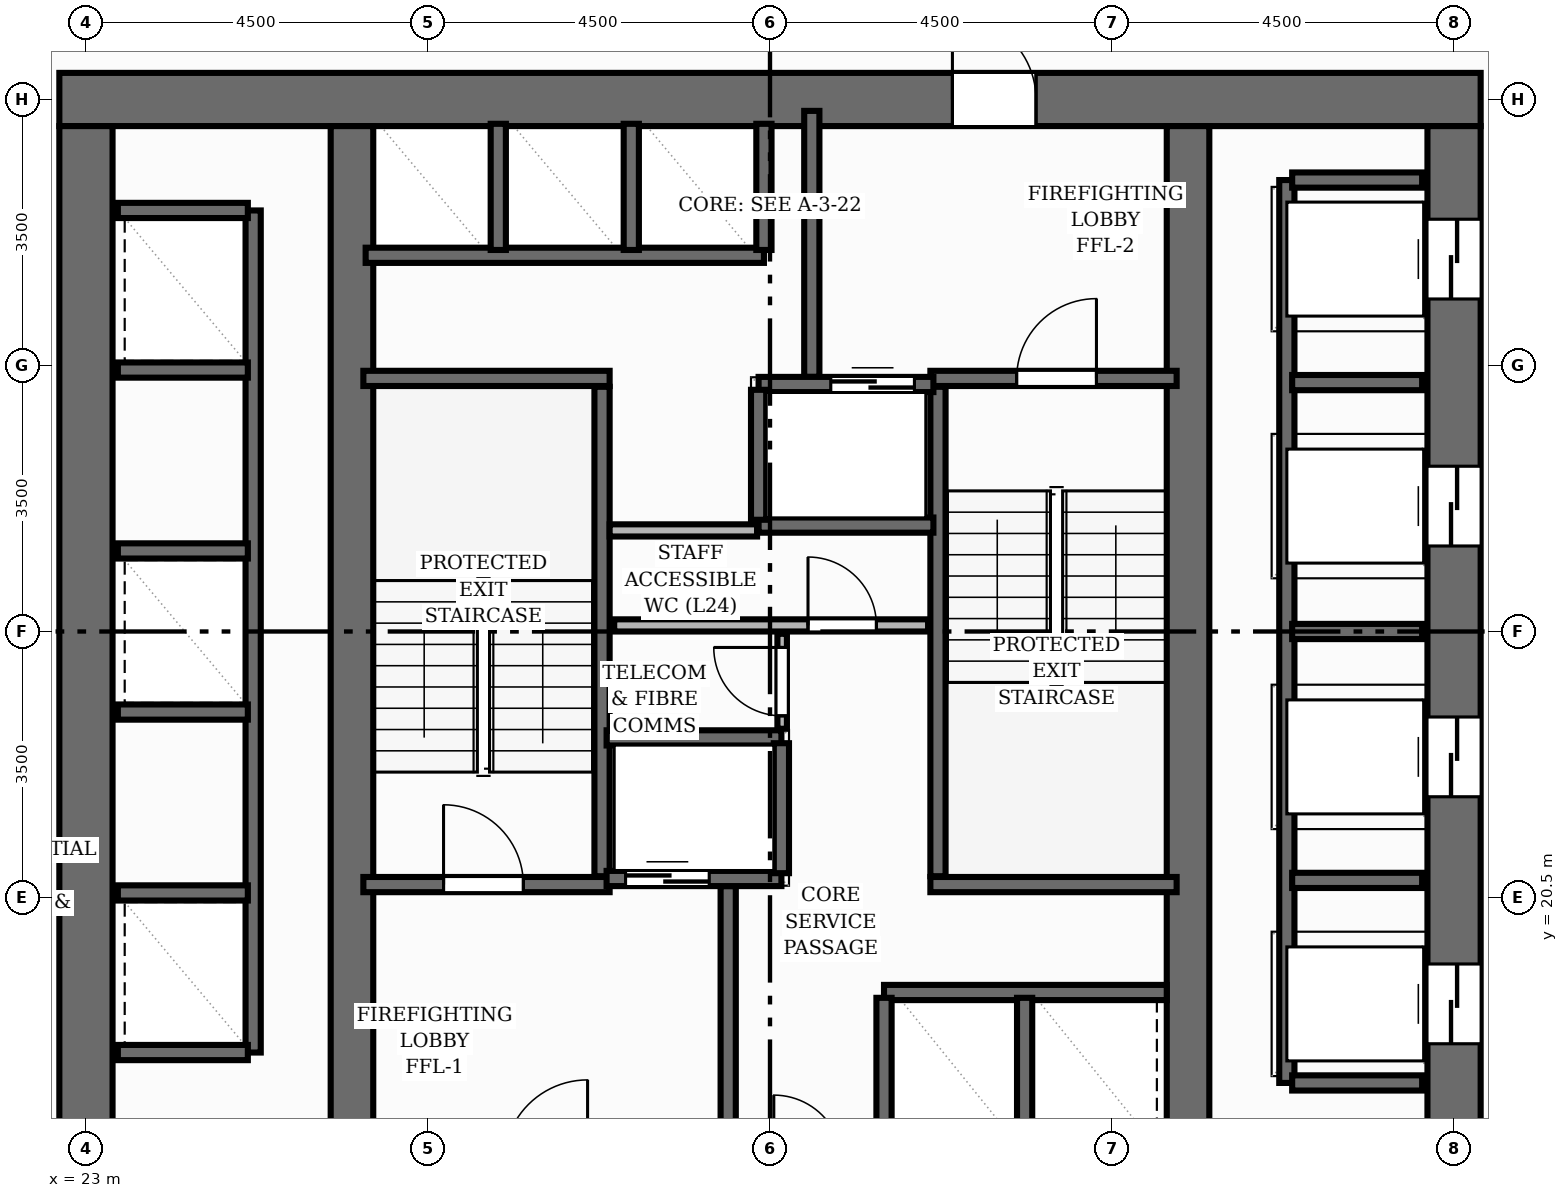
"""IFC4 building model, lengths in metres.
Left out: names, types, materials, properties, quantities, classifications, styles, units other than length and angle.
Written with IfcOpenShell. Run it as: python <this file> out.ifc"""

import sys

from ifc_helpers import new_model, si_unit, direction, frame, frame_2d, origin, place, context, subcontext, project, spatial, rectangle, extrude, element, fill, save


model = new_model("IFC4")
c1 = context("Model", 3, precision=1e-05, world=origin(), true_north=direction((0.0, 1.0)))
c2 = subcontext(c1, "Body", "Model", "MODEL_VIEW")
j1 = project(units=[si_unit("LENGTHUNIT", "METRE"), si_unit("PLANEANGLEUNIT", "RADIAN")], contexts=[c1])
p1 = place(None, origin())
s1 = spatial("IfcSite", under=j1, at=p1, CompositionType="ELEMENT")
p2 = place(p1, origin())
s2 = spatial("IfcBuilding", under=s1, at=p2, CompositionType="ELEMENT")
p3 = place(p2, frame((0.0, 0.0, 83.68)))
s3 = spatial("IfcBuildingStorey", under=s2, at=p3, CompositionType="ELEMENT", Elevation=83.68)
p4 = place(p3, frame((22.65, 31.0, 0.0), z_axis=(0.0, 0.0, 1.0), x_axis=(1.0, 0.0, 0.0)))
e1 = element("IfcWall", 1, at=p4, inside=s3, PredefinedType="SHEAR", context=c2, shape_type="SweptSolid", body=[
    extrude(rectangle(XDim=18.7, YDim=0.7, at=frame_2d((9.35, 0.0))), origin(), (0.0, 0.0, 1.0), 3.2),
])
p5 = place(p4, frame((11.75, 0.0, 0.0)))
e2 = element("IfcOpeningElement", 2, at=p5, cuts=e1, PredefinedType="OPENING", context=c2, shape_type="SweptSolid", body=[
    extrude(rectangle(XDim=1.1, YDim=2.15, at=frame_2d((0.55, 1.075))), frame((0.0, 0.36, 0.0), z_axis=(0.0, -1.0, 0.0), x_axis=(1.0, 0.0, 0.0)), (0.0, 0.0, 1.0), 0.72),
])
p6 = place(p3, frame((23.0, 17.35, 0.0), z_axis=(0.0, 0.0, 1.0), x_axis=(0.0, 1.0, 0.0)))
e3 = element("IfcWall", 3, at=p6, inside=s3, PredefinedType="SHEAR", context=c2, shape_type="SweptSolid", body=[
    extrude(rectangle(XDim=13.3, YDim=0.7, at=frame_2d((6.65, 0.0))), origin(), (0.0, 0.0, 1.0), 3.2),
])
p7 = place(p3, frame((41.0, 17.35, 0.0), z_axis=(0.0, 0.0, 1.0), x_axis=(0.0, 1.0, 0.0)))
e4 = element("IfcWall", 4, at=p7, inside=s3, PredefinedType="SHEAR", context=c2, shape_type="SweptSolid", body=[
    extrude(rectangle(XDim=13.3, YDim=0.7, at=frame_2d((6.65, 0.0))), origin(), (0.0, 0.0, 1.0), 3.2),
])
p8 = place(p7, frame((1.225, 0.0, 0.0)))
e5 = element("IfcOpeningElement", 5, at=p8, cuts=e4, PredefinedType="OPENING", context=c2, shape_type="SweptSolid", body=[
    extrude(rectangle(XDim=1.05, YDim=2.15, at=frame_2d((0.525, 1.075))), frame((0.0, 0.36, 0.0), z_axis=(0.0, -1.0, 0.0), x_axis=(1.0, 0.0, 0.0)), (0.0, 0.0, 1.0), 0.72),
])
p9 = place(p7, frame((4.475, 0.0, 0.0)))
e6 = element("IfcOpeningElement", 6, at=p9, cuts=e4, PredefinedType="OPENING", context=c2, shape_type="SweptSolid", body=[
    extrude(rectangle(XDim=1.05, YDim=2.15, at=frame_2d((0.525, 1.075))), frame((0.0, 0.36, 0.0), z_axis=(0.0, -1.0, 0.0), x_axis=(1.0, 0.0, 0.0)), (0.0, 0.0, 1.0), 0.72),
])
p10 = place(p7, frame((7.775, 0.0, 0.0)))
e7 = element("IfcOpeningElement", 7, at=p10, cuts=e4, PredefinedType="OPENING", context=c2, shape_type="SweptSolid", body=[
    extrude(rectangle(XDim=1.05, YDim=2.15, at=frame_2d((0.525, 1.075))), frame((0.0, 0.36, 0.0), z_axis=(0.0, -1.0, 0.0), x_axis=(1.0, 0.0, 0.0)), (0.0, 0.0, 1.0), 0.72),
])
p11 = place(p7, frame((11.025, 0.0, 0.0)))
e8 = element("IfcOpeningElement", 8, at=p11, cuts=e4, PredefinedType="OPENING", context=c2, shape_type="SweptSolid", body=[
    extrude(rectangle(XDim=1.05, YDim=2.15, at=frame_2d((0.525, 1.075))), frame((0.0, 0.36, 0.0), z_axis=(0.0, -1.0, 0.0), x_axis=(1.0, 0.0, 0.0)), (0.0, 0.0, 1.0), 0.72),
])
for number, where, z_axis, x_axis in (
    (9, (26.5, 17.35, 0.0), (0.0, 0.0, 1.0), (0.0, 1.0, 0.0)),
    (10, (37.5, 17.35, 0.0), (0.0, 0.0, 1.0), (0.0, 1.0, 0.0)),
):
    element("IfcWall", number, at=place(p3, frame(where, z_axis=z_axis, x_axis=x_axis)), inside=s3, PredefinedType="SHEAR", context=c2, shape_type="SweptSolid", body=[
        extrude(rectangle(XDim=13.3, YDim=0.56, at=frame_2d((6.65, 0.0))), origin(), (0.0, 0.0, 1.0), 3.2),
    ])
p12 = place(p3, frame((29.79, 20.78, 0.0), z_axis=(0.0, 0.0, 1.0), x_axis=(0.0, 1.0, 0.0)))
e11 = element("IfcWall", 11, at=p12, inside=s3, PredefinedType="SHEAR", context=c2, shape_type="SweptSolid", body=[
    extrude(rectangle(XDim=6.44, YDim=0.2, at=frame_2d((3.22, 0.0))), origin(), (0.0, 0.0, 1.0), 3.2),
])
p13 = place(p3, frame((26.65, 27.33, 0.0), z_axis=(0.0, 0.0, 1.0), x_axis=(1.0, 0.0, 0.0)))
e12 = element("IfcWall", 12, at=p13, inside=s3, PredefinedType="SHEAR", context=c2, shape_type="SweptSolid", body=[
    extrude(rectangle(XDim=3.24, YDim=0.2, at=frame_2d((1.62, 0.0))), origin(), (0.0, 0.0, 1.0), 3.2),
])
p14 = place(p3, frame((26.65, 20.67, 0.0), z_axis=(0.0, 0.0, 1.0), x_axis=(1.0, 0.0, 0.0)))
e13 = element("IfcWall", 13, at=p14, inside=s3, PredefinedType="SHEAR", context=c2, shape_type="SweptSolid", body=[
    extrude(rectangle(XDim=3.24, YDim=0.2, at=frame_2d((1.62, 0.0))), origin(), (0.0, 0.0, 1.0), 3.2),
])
p15 = place(p14, frame((1.055, 0.0, 0.0)))
e14 = element("IfcOpeningElement", 14, at=p15, cuts=e13, PredefinedType="OPENING", context=c2, shape_type="SweptSolid", body=[
    extrude(rectangle(XDim=1.05, YDim=2.15, at=frame_2d((0.525, 1.075))), frame((0.0, 0.11, 0.0), z_axis=(0.0, -1.0, 0.0), x_axis=(1.0, 0.0, 0.0)), (0.0, 0.0, 1.0), 0.22),
])
p16 = place(p3, frame((34.21, 20.78, 0.0), z_axis=(0.0, 0.0, 1.0), x_axis=(0.0, 1.0, 0.0)))
e15 = element("IfcWall", 15, at=p16, inside=s3, PredefinedType="SHEAR", context=c2, shape_type="SweptSolid", body=[
    extrude(rectangle(XDim=6.44, YDim=0.2, at=frame_2d((3.22, 0.0))), origin(), (0.0, 0.0, 1.0), 3.2),
])
p17 = place(p3, frame((34.11, 20.67, 0.0), z_axis=(0.0, 0.0, 1.0), x_axis=(1.0, 0.0, 0.0)))
e16 = element("IfcWall", 16, at=p17, inside=s3, PredefinedType="SHEAR", context=c2, shape_type="SweptSolid", body=[
    extrude(rectangle(XDim=3.24, YDim=0.2, at=frame_2d((1.62, 0.0))), origin(), (0.0, 0.0, 1.0), 3.2),
])
p18 = place(p3, frame((34.11, 27.33, 0.0), z_axis=(0.0, 0.0, 1.0), x_axis=(1.0, 0.0, 0.0)))
e17 = element("IfcWall", 17, at=p18, inside=s3, PredefinedType="SHEAR", context=c2, shape_type="SweptSolid", body=[
    extrude(rectangle(XDim=3.24, YDim=0.2, at=frame_2d((1.62, 0.0))), origin(), (0.0, 0.0, 1.0), 3.2),
])
p19 = place(p18, frame((1.135, 0.0, 0.0)))
e18 = element("IfcOpeningElement", 18, at=p19, cuts=e17, PredefinedType="OPENING", context=c2, shape_type="SweptSolid", body=[
    extrude(rectangle(XDim=1.05, YDim=2.15, at=frame_2d((0.525, 1.075))), frame((0.0, 0.11, 0.0), z_axis=(0.0, -1.0, 0.0), x_axis=(1.0, 0.0, 0.0)), (0.0, 0.0, 1.0), 0.22),
])
for number, where, z_axis, x_axis in (
    (19, (31.45, 17.15, 0.0), (0.0, 0.0, 1.0), (0.0, 1.0, 0.0)),
    (20, (32.55, 27.35, 0.0), (0.0, 0.0, 1.0), (0.0, 1.0, 0.0)),
):
    element("IfcWall", number, at=place(p3, frame(where, z_axis=z_axis, x_axis=x_axis)), inside=s3, PredefinedType="SHEAR", context=c2, shape_type="SweptSolid", body=[
        extrude(rectangle(XDim=3.5, YDim=0.2, at=frame_2d((1.75, 0.0))), origin(), (0.0, 0.0, 1.0), 3.2),
    ])
p20 = place(p3, frame((29.85, 20.75, 0.0), z_axis=(0.0, 0.0, 1.0), x_axis=(1.0, 0.0, 0.0)))
e21 = element("IfcWall", 21, at=p20, inside=s3, PredefinedType="SHEAR", context=c2, shape_type="SweptSolid", body=[
    extrude(rectangle(XDim=2.3, YDim=0.2, at=frame_2d((1.15, 0.0))), origin(), (0.0, 0.0, 1.0), 3.2),
])
p21 = place(p20, frame((0.25, 0.0, 0.0)))
e22 = element("IfcOpeningElement", 22, at=p21, cuts=e21, PredefinedType="OPENING", context=c2, shape_type="SweptSolid", body=[
    extrude(rectangle(XDim=1.1, YDim=2.15, at=frame_2d((0.55, 1.075))), frame((0.0, 0.11, 0.0), z_axis=(0.0, -1.0, 0.0), x_axis=(1.0, 0.0, 0.0)), (0.0, 0.0, 1.0), 0.22),
])
p22 = place(p3, frame((29.85, 22.6, 0.0), z_axis=(0.0, 0.0, 1.0), x_axis=(1.0, 0.0, 0.0)))
e23 = element("IfcWall", 23, at=p22, inside=s3, PredefinedType="SHEAR", context=c2, shape_type="SweptSolid", body=[
    extrude(rectangle(XDim=2.3, YDim=0.2, at=frame_2d((1.15, 0.0))), origin(), (0.0, 0.0, 1.0), 3.2),
])
p23 = place(p3, frame((32.15, 20.82, 0.0), z_axis=(0.0, 0.0, 1.0), x_axis=(0.0, 1.0, 0.0)))
e24 = element("IfcWall", 24, at=p23, inside=s3, PredefinedType="SHEAR", context=c2, shape_type="SweptSolid", body=[
    extrude(rectangle(XDim=1.71, YDim=0.2, at=frame_2d((0.855, 0.0))), origin(), (0.0, 0.0, 1.0), 3.2),
])
p24 = place(p3, frame((31.85, 27.25, 0.0), z_axis=(0.0, 0.0, 1.0), x_axis=(1.0, 0.0, 0.0)))
e25 = element("IfcWall", 25, at=p24, inside=s3, PredefinedType="SHEAR", context=c2, shape_type="SweptSolid", body=[
    extrude(rectangle(XDim=2.3, YDim=0.2, at=frame_2d((1.15, 0.0))), origin(), (0.0, 0.0, 1.0), 3.2),
])
p25 = place(p24, frame((0.95, 0.0, 0.0)))
e26 = element("IfcOpeningElement", 26, at=p25, cuts=e25, PredefinedType="OPENING", context=c2, shape_type="SweptSolid", body=[
    extrude(rectangle(XDim=1.1, YDim=2.15, at=frame_2d((0.55, 1.075))), frame((0.0, 0.11, 0.0), z_axis=(0.0, -1.0, 0.0), x_axis=(1.0, 0.0, 0.0)), (0.0, 0.0, 1.0), 0.22),
])
p26 = place(p3, frame((31.85, 25.4, 0.0), z_axis=(0.0, 0.0, 1.0), x_axis=(1.0, 0.0, 0.0)))
e27 = element("IfcWall", 27, at=p26, inside=s3, PredefinedType="SHEAR", context=c2, shape_type="SweptSolid", body=[
    extrude(rectangle(XDim=2.3, YDim=0.2, at=frame_2d((1.15, 0.0))), origin(), (0.0, 0.0, 1.0), 3.2),
])
p27 = place(p3, frame((31.85, 25.47, 0.0), z_axis=(0.0, 0.0, 1.0), x_axis=(0.0, 1.0, 0.0)))
e28 = element("IfcWall", 28, at=p27, inside=s3, PredefinedType="SHEAR", context=c2, shape_type="SweptSolid", body=[
    extrude(rectangle(XDim=1.71, YDim=0.2, at=frame_2d((0.855, 0.0))), origin(), (0.0, 0.0, 1.0), 3.2),
])
p28 = place(p3, frame((38.8, 18.06, 0.0), z_axis=(0.0, 0.0, 1.0), x_axis=(0.0, 1.0, 0.0)))
e29 = element("IfcWall", 29, at=p28, inside=s3, PredefinedType="SHEAR", context=c2, shape_type="SweptSolid", body=[
    extrude(rectangle(XDim=11.88, YDim=0.2, at=frame_2d((5.94, 0.0))), origin(), (0.0, 0.0, 1.0), 3.2),
])
for number, where, z_axis, x_axis in (
    (30, (38.87, 18.06, 0.0), (0.0, 0.0, 1.0), (1.0, 0.0, 0.0)),
    (31, (38.87, 29.94, 0.0), (0.0, 0.0, 1.0), (1.0, 0.0, 0.0)),
    (32, (38.87, 20.725, 0.0), (0.0, 0.0, 1.0), (1.0, 0.0, 0.0)),
    (33, (38.87, 24.0, 0.0), (0.0, 0.0, 1.0), (1.0, 0.0, 0.0)),
    (34, (38.87, 27.275, 0.0), (0.0, 0.0, 1.0), (1.0, 0.0, 0.0)),
):
    element("IfcWall", number, at=place(p3, frame(where, z_axis=z_axis, x_axis=x_axis)), inside=s3, PredefinedType="SHEAR", context=c2, shape_type="SweptSolid", body=[
        extrude(rectangle(XDim=1.71, YDim=0.2, at=frame_2d((0.855, 0.0))), origin(), (0.0, 0.0, 1.0), 3.2),
    ])
p29 = place(p3, frame((25.2, 18.46, 0.0), z_axis=(0.0, 0.0, 1.0), x_axis=(0.0, 1.0, 0.0)))
e35 = element("IfcWall", 35, at=p29, inside=s3, PredefinedType="SHEAR", context=c2, shape_type="SweptSolid", body=[
    extrude(rectangle(XDim=11.08, YDim=0.2, at=frame_2d((5.54, 0.0))), origin(), (0.0, 0.0, 1.0), 3.2),
])
for number, where, z_axis, x_axis in (
    (36, (23.42, 18.46, 0.0), (0.0, 0.0, 1.0), (1.0, 0.0, 0.0)),
    (37, (23.42, 29.54, 0.0), (0.0, 0.0, 1.0), (1.0, 0.0, 0.0)),
    (38, (23.42, 20.56, 0.0), (0.0, 0.0, 1.0), (1.0, 0.0, 0.0)),
    (39, (23.42, 22.94, 0.0), (0.0, 0.0, 1.0), (1.0, 0.0, 0.0)),
    (40, (23.42, 25.06, 0.0), (0.0, 0.0, 1.0), (1.0, 0.0, 0.0)),
    (41, (23.42, 27.44, 0.0), (0.0, 0.0, 1.0), (1.0, 0.0, 0.0)),
):
    element("IfcWall", number, at=place(p3, frame(where, z_axis=z_axis, x_axis=x_axis)), inside=s3, PredefinedType="SHEAR", context=c2, shape_type="SweptSolid", body=[
        extrude(rectangle(XDim=1.71, YDim=0.2, at=frame_2d((0.855, 0.0))), origin(), (0.0, 0.0, 1.0), 3.2),
    ])
p30 = place(p3, frame((26.68, 28.95, 0.0), z_axis=(0.0, 0.0, 1.0), x_axis=(1.0, 0.0, 0.0)))
e42 = element("IfcWall", 42, at=p30, inside=s3, PredefinedType="SHEAR", context=c2, shape_type="SweptSolid", body=[
    extrude(rectangle(XDim=5.24, YDim=0.2, at=frame_2d((2.62, 0.0))), origin(), (0.0, 0.0, 1.0), 3.2),
])
for number, where, z_axis, x_axis in (
    (43, (31.92, 29.02, 0.0), (0.0, 0.0, 1.0), (0.0, 1.0, 0.0)),
    (44, (28.425, 29.02, 0.0), (0.0, 0.0, 1.0), (0.0, 1.0, 0.0)),
    (45, (30.175, 29.02, 0.0), (0.0, 0.0, 1.0), (0.0, 1.0, 0.0)),
):
    element("IfcWall", number, at=place(p3, frame(where, z_axis=z_axis, x_axis=x_axis)), inside=s3, PredefinedType="SHEAR", context=c2, shape_type="SweptSolid", body=[
        extrude(rectangle(XDim=1.66, YDim=0.2, at=frame_2d((0.83, 0.0))), origin(), (0.0, 0.0, 1.0), 3.2),
    ])
p31 = place(p3, frame((33.5, 19.25, 0.0), z_axis=(0.0, 0.0, 1.0), x_axis=(1.0, 0.0, 0.0)))
e46 = element("IfcWall", 46, at=p31, inside=s3, PredefinedType="SHEAR", context=c2, shape_type="SweptSolid", body=[
    extrude(rectangle(XDim=3.72, YDim=0.2, at=frame_2d((1.86, 0.0))), origin(), (0.0, 0.0, 1.0), 3.2),
])
for number, where, z_axis, x_axis in (
    (47, (33.5, 17.32, 0.0), (0.0, 0.0, 1.0), (0.0, 1.0, 0.0)),
    (48, (35.35, 17.32, 0.0), (0.0, 0.0, 1.0), (0.0, 1.0, 0.0)),
):
    element("IfcWall", number, at=place(p3, frame(where, z_axis=z_axis, x_axis=x_axis)), inside=s3, PredefinedType="SHEAR", context=c2, shape_type="SweptSolid", body=[
        extrude(rectangle(XDim=1.86, YDim=0.2, at=frame_2d((0.93, 0.0))), origin(), (0.0, 0.0, 1.0), 3.2),
    ])
p32 = place(p3, frame((29.95, 24.08, 0.0), z_axis=(0.0, 0.0, 1.0), x_axis=(1.0, 0.0, 0.0)))
e49 = element("IfcWall", 49, at=p32, inside=s3, PredefinedType="PLUMBINGWALL", context=c2, shape_type="SweptSolid", body=[
    extrude(rectangle(XDim=4.13, YDim=0.16, at=frame_2d((2.065, 0.0))), origin(), (0.0, 0.0, 1.0), 2.955),
])
p33 = place(p32, frame((2.55, 0.0, 0.0)))
e50 = element("IfcOpeningElement", 50, at=p33, cuts=e49, PredefinedType="OPENING", context=c2, shape_type="SweptSolid", body=[
    extrude(rectangle(XDim=0.9, YDim=2.1, at=frame_2d((0.45, 1.05))), frame((0.0, 0.09, 0.0), z_axis=(0.0, -1.0, 0.0), x_axis=(1.0, 0.0, 0.0)), (0.0, 0.0, 1.0), 0.18),
])
p34 = place(p3, frame((32.16, 22.72, 0.0), z_axis=(0.0, 0.0, 1.0), x_axis=(0.0, 1.0, 0.0)))
e51 = element("IfcWall", 51, at=p34, inside=s3, PredefinedType="PARTITIONING", context=c2, shape_type="SweptSolid", body=[
    extrude(rectangle(XDim=1.25, YDim=0.125, at=frame_2d((0.625, 0.0))), origin(), (0.0, 0.0, 1.0), 2.955),
])
p35 = place(p34, frame((0.17, 0.0, 0.0)))
e52 = element("IfcOpeningElement", 52, at=p35, cuts=e51, PredefinedType="OPENING", context=c2, shape_type="SweptSolid", body=[
    extrude(rectangle(XDim=0.9, YDim=2.1, at=frame_2d((0.45, 1.05))), frame((0.0, 0.073, 0.0), z_axis=(0.0, -1.0, 0.0), x_axis=(1.0, 0.0, 0.0)), (0.0, 0.0, 1.0), 0.145),
])
p36 = place(p3, frame((29.89, 25.33, 0.0), z_axis=(0.0, 0.0, 1.0), x_axis=(1.0, 0.0, 0.0)))
e53 = element("IfcWall", 53, at=p36, inside=s3, PredefinedType="PLUMBINGWALL", context=c2, shape_type="SweptSolid", body=[
    extrude(rectangle(XDim=1.94, YDim=0.16, at=frame_2d((0.97, 0.0))), origin(), (0.0, 0.0, 1.0), 2.955),
])
p37 = place(p15, origin())
e54 = element("IfcDoor", 54, at=p37, inside=s3, OperationType="SINGLE_SWING_LEFT", PredefinedType="DOOR", context=c2, shape_type="SweptSolid", body=[
    extrude(rectangle(XDim=1.05, YDim=2.15, at=frame_2d((0.525, 1.075))), frame((0.0, 0.025, 0.0), z_axis=(0.0, -1.0, 0.0), x_axis=(1.0, 0.0, 0.0)), (0.0, 0.0, 1.0), 0.05),
])
fill(e14, e54)
p38 = place(p19, origin())
e55 = element("IfcDoor", 55, at=p38, inside=s3, OperationType="SINGLE_SWING_RIGHT", PredefinedType="DOOR", context=c2, shape_type="SweptSolid", body=[
    extrude(rectangle(XDim=1.05, YDim=2.15, at=frame_2d((0.525, 1.075))), frame((0.0, 0.025, 0.0), z_axis=(0.0, -1.0, 0.0), x_axis=(1.0, 0.0, 0.0)), (0.0, 0.0, 1.0), 0.05),
])
fill(e18, e55)
p39 = place(p5, origin())
e56 = element("IfcDoor", 56, at=p39, inside=s3, OperationType="SINGLE_SWING_LEFT", PredefinedType="DOOR", context=c2, shape_type="SweptSolid", body=[
    extrude(rectangle(XDim=1.1, YDim=2.15, at=frame_2d((0.55, 1.075))), frame((0.0, 0.025, 0.0), z_axis=(0.0, -1.0, 0.0), x_axis=(1.0, 0.0, 0.0)), (0.0, 0.0, 1.0), 0.05),
])
fill(e2, e56)
p40 = place(p21, origin())
e57 = element("IfcDoor", 57, at=p40, inside=s3, OperationType="DOUBLE_DOOR_SLIDING", PredefinedType="DOOR", context=c2, shape_type="SweptSolid", body=[
    extrude(rectangle(XDim=1.1, YDim=2.15, at=frame_2d((0.55, 1.075))), frame((0.0, 0.025, 0.0), z_axis=(0.0, -1.0, 0.0), x_axis=(1.0, 0.0, 0.0)), (0.0, 0.0, 1.0), 0.05),
])
fill(e22, e57)
p41 = place(p25, origin())
e58 = element("IfcDoor", 58, at=p41, inside=s3, OperationType="DOUBLE_DOOR_SLIDING", PredefinedType="DOOR", context=c2, shape_type="SweptSolid", body=[
    extrude(rectangle(XDim=1.1, YDim=2.15, at=frame_2d((0.55, 1.075))), frame((0.0, 0.025, 0.0), z_axis=(0.0, -1.0, 0.0), x_axis=(1.0, 0.0, 0.0)), (0.0, 0.0, 1.0), 0.05),
])
fill(e26, e58)
p42 = place(p8, origin())
e59 = element("IfcDoor", 59, at=p42, inside=s3, OperationType="DOUBLE_DOOR_SLIDING", PredefinedType="DOOR", context=c2, shape_type="SweptSolid", body=[
    extrude(rectangle(XDim=1.05, YDim=2.15, at=frame_2d((0.525, 1.075))), frame((0.0, 0.025, 0.0), z_axis=(0.0, -1.0, 0.0), x_axis=(1.0, 0.0, 0.0)), (0.0, 0.0, 1.0), 0.05),
])
fill(e5, e59)
p43 = place(p9, origin())
e60 = element("IfcDoor", 60, at=p43, inside=s3, OperationType="DOUBLE_DOOR_SLIDING", PredefinedType="DOOR", context=c2, shape_type="SweptSolid", body=[
    extrude(rectangle(XDim=1.05, YDim=2.15, at=frame_2d((0.525, 1.075))), frame((0.0, 0.025, 0.0), z_axis=(0.0, -1.0, 0.0), x_axis=(1.0, 0.0, 0.0)), (0.0, 0.0, 1.0), 0.05),
])
fill(e6, e60)
p44 = place(p10, origin())
e61 = element("IfcDoor", 61, at=p44, inside=s3, OperationType="DOUBLE_DOOR_SLIDING", PredefinedType="DOOR", context=c2, shape_type="SweptSolid", body=[
    extrude(rectangle(XDim=1.05, YDim=2.15, at=frame_2d((0.525, 1.075))), frame((0.0, 0.025, 0.0), z_axis=(0.0, -1.0, 0.0), x_axis=(1.0, 0.0, 0.0)), (0.0, 0.0, 1.0), 0.05),
])
fill(e7, e61)
p45 = place(p11, origin())
e62 = element("IfcDoor", 62, at=p45, inside=s3, OperationType="DOUBLE_DOOR_SLIDING", PredefinedType="DOOR", context=c2, shape_type="SweptSolid", body=[
    extrude(rectangle(XDim=1.05, YDim=2.15, at=frame_2d((0.525, 1.075))), frame((0.0, 0.025, 0.0), z_axis=(0.0, -1.0, 0.0), x_axis=(1.0, 0.0, 0.0)), (0.0, 0.0, 1.0), 0.05),
])
fill(e8, e62)
p46 = place(p33, origin())
e63 = element("IfcDoor", 63, at=p46, inside=s3, OperationType="SINGLE_SWING_LEFT", PredefinedType="DOOR", context=c2, shape_type="SweptSolid", body=[
    extrude(rectangle(XDim=0.9, YDim=2.1, at=frame_2d((0.45, 1.05))), frame((0.0, 0.025, 0.0), z_axis=(0.0, -1.0, 0.0), x_axis=(1.0, 0.0, 0.0)), (0.0, 0.0, 1.0), 0.05),
])
fill(e50, e63)
p47 = place(p35, origin())
e64 = element("IfcDoor", 64, at=p47, inside=s3, OperationType="SINGLE_SWING_RIGHT", PredefinedType="DOOR", context=c2, shape_type="SweptSolid", body=[
    extrude(rectangle(XDim=0.9, YDim=2.1, at=frame_2d((0.45, 1.05))), frame((0.0, 0.025, 0.0), z_axis=(0.0, -1.0, 0.0), x_axis=(1.0, 0.0, 0.0)), (0.0, 0.0, 1.0), 0.05),
])
fill(e52, e64)
save(model, sys.argv[1])
